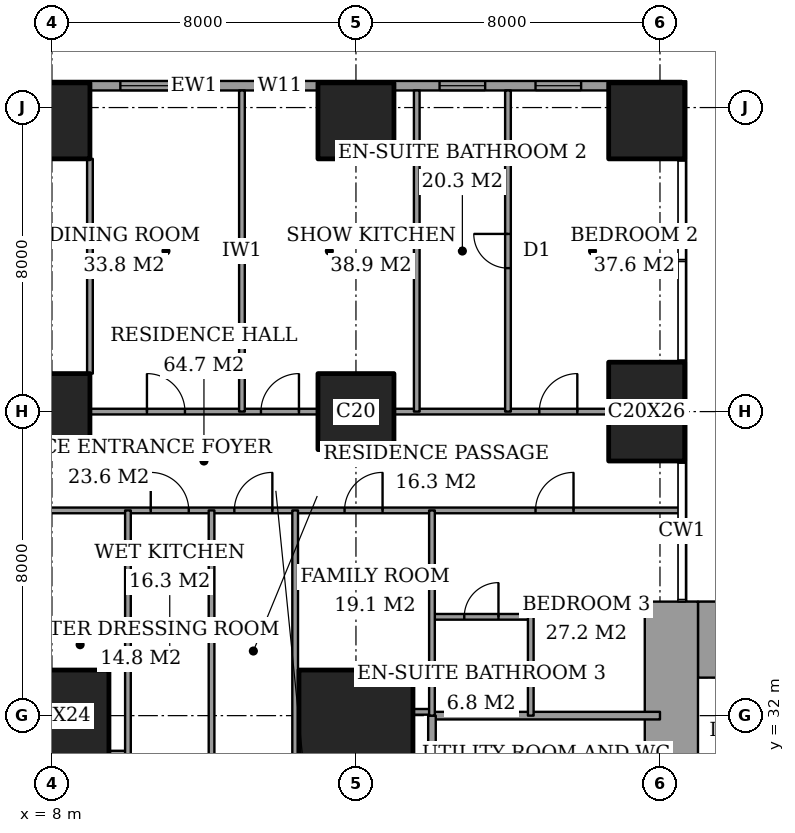
"""IFC4 building model, lengths in metres.
Left out: names, types, materials, properties, quantities, classifications, styles, units other than length and angle.
Written with IfcOpenShell. Run it as: python <this file> out.ifc"""

import sys

from ifc_helpers import new_model, si_unit, direction, frame, frame_2d, origin, origin_2d, place, context, subcontext, project, spatial, rectangle, extrude, element, fill, save


model = new_model("IFC4")
c1 = context("Model", 3, precision=1e-05, world=origin(), true_north=direction((0.0, 1.0)))
c2 = subcontext(c1, "Body", "Model", "MODEL_VIEW")
j1 = project(units=[si_unit("LENGTHUNIT", "METRE"), si_unit("PLANEANGLEUNIT", "RADIAN")], contexts=[c1])
p1 = place(None, origin())
s1 = spatial("IfcSite", under=j1, at=p1, CompositionType="ELEMENT")
p2 = place(p1, origin())
s2 = spatial("IfcBuilding", under=s1, at=p2, CompositionType="ELEMENT")
p3 = place(p2, frame((0.0, 0.0, 153.8)))
s3 = spatial("IfcBuildingStorey", under=s2, at=p3, CompositionType="ELEMENT", Elevation=153.8)
p4 = place(p3, frame((8.0, 32.0, 0.0), z_axis=(0.0, 0.0, 1.0), x_axis=(1.0, 0.0, 0.0)))
e1 = element("IfcColumn", 1, at=p4, inside=s3, PredefinedType="COLUMN", context=c2, shape_type="SweptSolid", body=[
    extrude(rectangle(XDim=3.0, YDim=2.4, at=origin_2d()), origin(), (0.0, 0.0, 1.0), 3.6),
])
for number, where, z_axis, x_axis in (
    (2, (8.0, 40.0, 0.0), (0.0, 0.0, 1.0), (1.0, 0.0, 0.0)),
    (3, (8.0, 47.65, 0.0), (0.0, 0.0, 1.0), (1.0, 0.0, 0.0)),
):
    element("IfcColumn", number, at=place(p3, frame(where, z_axis=z_axis, x_axis=x_axis)), inside=s3, PredefinedType="COLUMN", context=c2, shape_type="SweptSolid", body=[
        extrude(rectangle(XDim=2.0, YDim=2.0, at=origin_2d()), origin(), (0.0, 0.0, 1.0), 3.6),
    ])
p5 = place(p3, frame((16.0, 32.0, 0.0), z_axis=(0.0, 0.0, 1.0), x_axis=(1.0, 0.0, 0.0)))
e4 = element("IfcColumn", 4, at=p5, inside=s3, PredefinedType="COLUMN", context=c2, shape_type="SweptSolid", body=[
    extrude(rectangle(XDim=3.0, YDim=2.4, at=origin_2d()), origin(), (0.0, 0.0, 1.0), 3.6),
])
for number, where, z_axis, x_axis in (
    (5, (16.0, 40.0, 0.0), (0.0, 0.0, 1.0), (1.0, 0.0, 0.0)),
    (6, (16.0, 47.65, 0.0), (0.0, 0.0, 1.0), (1.0, 0.0, 0.0)),
):
    element("IfcColumn", number, at=place(p3, frame(where, z_axis=z_axis, x_axis=x_axis)), inside=s3, PredefinedType="COLUMN", context=c2, shape_type="SweptSolid", body=[
        extrude(rectangle(XDim=2.0, YDim=2.0, at=origin_2d()), origin(), (0.0, 0.0, 1.0), 3.6),
    ])
p6 = place(p3, frame((23.65, 40.0, 0.0), z_axis=(0.0, 0.0, 1.0), x_axis=(1.0, 0.0, 0.0)))
e7 = element("IfcColumn", 7, at=p6, inside=s3, PredefinedType="COLUMN", context=c2, shape_type="SweptSolid", body=[
    extrude(rectangle(XDim=2.0, YDim=2.6, at=origin_2d()), origin(), (0.0, 0.0, 1.0), 3.6),
])
p7 = place(p3, frame((23.65, 47.65, 0.0), z_axis=(0.0, 0.0, 1.0), x_axis=(1.0, 0.0, 0.0)))
e8 = element("IfcColumn", 8, at=p7, inside=s3, PredefinedType="COLUMN", context=c2, shape_type="SweptSolid", body=[
    extrude(rectangle(XDim=2.0, YDim=2.0, at=origin_2d()), origin(), (0.0, 0.0, 1.0), 3.6),
])
p8 = place(p3, frame((25.0, 34.0, 0.0), z_axis=(0.0, 0.0, 1.0), x_axis=(1.0, 0.0, 0.0)))
e9 = element("IfcWall", 9, at=p8, inside=s3, PredefinedType="SHEAR", context=c2, shape_type="SweptSolid", body=[
    extrude(rectangle(XDim=3.15, YDim=2.0, at=frame_2d((1.575, 0.0))), origin(), (0.0, 0.0, 1.0), 3.6),
])
p9 = place(p3, frame((24.3, 23.15, 0.0), z_axis=(0.0, 0.0, 1.0), x_axis=(0.0, 1.0, 0.0)))
e10 = element("IfcWall", 10, at=p9, inside=s3, PredefinedType="SHEAR", context=c2, shape_type="SweptSolid", body=[
    extrude(rectangle(XDim=11.85, YDim=1.4, at=frame_2d((5.925, 0.0))), origin(), (0.0, 0.0, 1.0), 3.6),
])
p10 = place(p9, frame((0.75, 0.0, 0.0)))
e11 = element("IfcOpeningElement", 11, at=p10, cuts=e10, PredefinedType="OPENING", context=c2, shape_type="SweptSolid", body=[
    extrude(rectangle(XDim=1.8, YDim=2.4, at=frame_2d((0.9, 1.2))), frame((0.0, 0.71, 0.0), z_axis=(0.0, -1.0, 0.0), x_axis=(1.0, 0.0, 0.0)), (0.0, 0.0, 1.0), 1.42),
])
p11 = place(p3, frame((24.575, 48.575, 0.0), z_axis=(0.0, 0.0, 1.0), x_axis=(-1.0, 0.0, 0.0)))
e12 = element("IfcWall", 12, at=p11, inside=s3, PredefinedType="SOLIDWALL", context=c2, shape_type="SweptSolid", body=[
    extrude(rectangle(XDim=21.4, YDim=0.25, at=frame_2d((10.7, 0.0))), origin(), (0.0, 0.0, 1.0), 3.6),
])
p12 = place(p11, frame((2.65, 0.0, 0.4)))
e13 = element("IfcOpeningElement", 13, at=p12, cuts=e12, PredefinedType="OPENING", context=c2, shape_type="SweptSolid", body=[
    extrude(rectangle(XDim=1.2, YDim=2.2, at=frame_2d((0.6, 1.1))), frame((0.0, 0.135, 0.0), z_axis=(0.0, -1.0, 0.0), x_axis=(1.0, 0.0, 0.0)), (0.0, 0.0, 1.0), 0.27),
])
p13 = place(p11, frame((5.175, 0.0, 0.4)))
e14 = element("IfcOpeningElement", 14, at=p13, cuts=e12, PredefinedType="OPENING", context=c2, shape_type="SweptSolid", body=[
    extrude(rectangle(XDim=1.2, YDim=2.2, at=frame_2d((0.6, 1.1))), frame((0.0, 0.135, 0.0), z_axis=(0.0, -1.0, 0.0), x_axis=(1.0, 0.0, 0.0)), (0.0, 0.0, 1.0), 0.27),
])
p14 = place(p11, frame((9.975, 0.0, 0.4)))
e15 = element("IfcOpeningElement", 15, at=p14, cuts=e12, PredefinedType="OPENING", context=c2, shape_type="SweptSolid", body=[
    extrude(rectangle(XDim=1.2, YDim=2.2, at=frame_2d((0.6, 1.1))), frame((0.0, 0.135, 0.0), z_axis=(0.0, -1.0, 0.0), x_axis=(1.0, 0.0, 0.0)), (0.0, 0.0, 1.0), 0.27),
])
p15 = place(p11, frame((12.375, 0.0, 0.4)))
e16 = element("IfcOpeningElement", 16, at=p15, cuts=e12, PredefinedType="OPENING", context=c2, shape_type="SweptSolid", body=[
    extrude(rectangle(XDim=2.4, YDim=2.2, at=frame_2d((1.2, 1.1))), frame((0.0, 0.135, 0.0), z_axis=(0.0, -1.0, 0.0), x_axis=(1.0, 0.0, 0.0)), (0.0, 0.0, 1.0), 0.27),
])
p16 = place(p11, frame((18.225, 0.0, 0.4)))
e17 = element("IfcOpeningElement", 17, at=p16, cuts=e12, PredefinedType="OPENING", context=c2, shape_type="SweptSolid", body=[
    extrude(rectangle(XDim=2.4, YDim=2.2, at=frame_2d((1.2, 1.1))), frame((0.0, 0.135, 0.0), z_axis=(0.0, -1.0, 0.0), x_axis=(1.0, 0.0, 0.0)), (0.0, 0.0, 1.0), 0.27),
])
p17 = place(p3, frame((9.5, 31.0, 0.0), z_axis=(0.0, 0.0, 1.0), x_axis=(1.0, 0.0, 0.0)))
e18 = element("IfcWall", 18, at=p17, inside=s3, PredefinedType="PARTITIONING", context=c2, shape_type="SweptSolid", body=[
    extrude(rectangle(XDim=0.5, YDim=0.15, at=frame_2d((0.25, 0.0))), origin(), (0.0, 0.0, 1.0), 3.35),
])
p18 = place(p3, frame((18.0, 32.0, 0.0), z_axis=(0.0, 0.0, 1.0), x_axis=(1.0, 0.0, 0.0)))
e19 = element("IfcWall", 19, at=p18, inside=s3, PredefinedType="PARTITIONING", context=c2, shape_type="SweptSolid", body=[
    extrude(rectangle(XDim=6.0, YDim=0.2, at=frame_2d((3.0, 0.0))), origin(), (0.0, 0.0, 1.0), 2.634),
])
p19 = place(p3, frame((17.5, 32.1, 0.0), z_axis=(0.0, 0.0, 1.0), x_axis=(1.0, 0.0, 0.0)))
e20 = element("IfcWall", 20, at=p19, inside=s3, PredefinedType="PARTITIONING", context=c2, shape_type="SweptSolid", body=[
    extrude(rectangle(XDim=0.5, YDim=0.15, at=frame_2d((0.25, 0.0))), origin(), (0.0, 0.0, 1.0), 2.634),
])
p20 = place(p3, frame((18.0, 34.6, 0.0), z_axis=(0.0, 0.0, 1.0), x_axis=(1.0, 0.0, 0.0)))
e21 = element("IfcWall", 21, at=p20, inside=s3, PredefinedType="PARTITIONING", context=c2, shape_type="SweptSolid", body=[
    extrude(rectangle(XDim=2.6, YDim=0.15, at=frame_2d((1.3, 0.0))), origin(), (0.0, 0.0, 1.0), 3.35),
])
p21 = place(p20, frame((0.85, 0.0, 0.0)))
e22 = element("IfcOpeningElement", 22, at=p21, cuts=e21, PredefinedType="OPENING", context=c2, shape_type="SweptSolid", body=[
    extrude(rectangle(XDim=0.9, YDim=2.1, at=frame_2d((0.45, 1.05))), frame((0.0, 0.085, 0.0), z_axis=(0.0, -1.0, 0.0), x_axis=(1.0, 0.0, 0.0)), (0.0, 0.0, 1.0), 0.17),
])
p22 = place(p3, frame((-0.45, 37.4, 0.0), z_axis=(0.0, 0.0, 1.0), x_axis=(1.0, 0.0, 0.0)))
e23 = element("IfcWall", 23, at=p22, inside=s3, PredefinedType="PARTITIONING", context=c2, shape_type="SweptSolid", body=[
    extrude(rectangle(XDim=25.011, YDim=0.15, at=frame_2d((12.505, 0.0))), origin(), (0.0, 0.0, 1.0), 3.35),
])
p23 = place(p22, frame((13.25, 0.0, 0.0)))
e24 = element("IfcOpeningElement", 24, at=p23, cuts=e23, PredefinedType="OPENING", context=c2, shape_type="SweptSolid", body=[
    extrude(rectangle(XDim=1.0, YDim=2.1, at=frame_2d((0.5, 1.05))), frame((0.0, 0.085, 0.0), z_axis=(0.0, -1.0, 0.0), x_axis=(1.0, 0.0, 0.0)), (0.0, 0.0, 1.0), 0.17),
])
p24 = place(p22, frame((3.087, 0.0, 0.0)))
e25 = element("IfcOpeningElement", 25, at=p24, cuts=e23, PredefinedType="OPENING", context=c2, shape_type="SweptSolid", body=[
    extrude(rectangle(XDim=1.0, YDim=2.1, at=frame_2d((0.5, 1.05))), frame((0.0, 0.085, 0.0), z_axis=(0.0, -1.0, 0.0), x_axis=(1.0, 0.0, 0.0)), (0.0, 0.0, 1.0), 0.17),
])
p25 = place(p22, frame((11.05, 0.0, 0.0)))
e26 = element("IfcOpeningElement", 26, at=p25, cuts=e23, PredefinedType="OPENING", context=c2, shape_type="SweptSolid", body=[
    extrude(rectangle(XDim=1.0, YDim=2.1, at=frame_2d((0.5, 1.05))), frame((0.0, 0.085, 0.0), z_axis=(0.0, -1.0, 0.0), x_axis=(1.0, 0.0, 0.0)), (0.0, 0.0, 1.0), 0.17),
])
p26 = place(p22, frame((16.15, 0.0, 0.0)))
e27 = element("IfcOpeningElement", 27, at=p26, cuts=e23, PredefinedType="OPENING", context=c2, shape_type="SweptSolid", body=[
    extrude(rectangle(XDim=1.0, YDim=2.1, at=frame_2d((0.5, 1.05))), frame((0.0, 0.085, 0.0), z_axis=(0.0, -1.0, 0.0), x_axis=(1.0, 0.0, 0.0)), (0.0, 0.0, 1.0), 0.17),
])
p27 = place(p22, frame((21.175, 0.0, 0.0)))
e28 = element("IfcOpeningElement", 28, at=p27, cuts=e23, PredefinedType="OPENING", context=c2, shape_type="SweptSolid", body=[
    extrude(rectangle(XDim=1.0, YDim=2.1, at=frame_2d((0.5, 1.05))), frame((0.0, 0.085, 0.0), z_axis=(0.0, -1.0, 0.0), x_axis=(1.0, 0.0, 0.0)), (0.0, 0.0, 1.0), 0.17),
])
p28 = place(p3, frame((9.0, 40.0, 0.0), z_axis=(0.0, 0.0, 1.0), x_axis=(1.0, 0.0, 0.0)))
e29 = element("IfcWall", 29, at=p28, inside=s3, PredefinedType="PARTITIONING", context=c2, shape_type="SweptSolid", body=[
    extrude(rectangle(XDim=6.0, YDim=0.15, at=frame_2d((3.0, 0.0))), origin(), (0.0, 0.0, 1.0), 3.35),
])
p29 = place(p28, frame((1.5, 0.0, 0.0)))
e30 = element("IfcOpeningElement", 30, at=p29, cuts=e29, PredefinedType="OPENING", context=c2, shape_type="SweptSolid", body=[
    extrude(rectangle(XDim=1.0, YDim=2.1, at=frame_2d((0.5, 1.05))), frame((0.0, 0.085, 0.0), z_axis=(0.0, -1.0, 0.0), x_axis=(1.0, 0.0, 0.0)), (0.0, 0.0, 1.0), 0.17),
])
p30 = place(p28, frame((4.5, 0.0, 0.0)))
e31 = element("IfcOpeningElement", 31, at=p30, cuts=e29, PredefinedType="OPENING", context=c2, shape_type="SweptSolid", body=[
    extrude(rectangle(XDim=1.0, YDim=2.1, at=frame_2d((0.5, 1.05))), frame((0.0, 0.085, 0.0), z_axis=(0.0, -1.0, 0.0), x_axis=(1.0, 0.0, 0.0)), (0.0, 0.0, 1.0), 0.17),
])
p31 = place(p3, frame((17.0, 40.0, 0.0), z_axis=(0.0, 0.0, 1.0), x_axis=(1.0, 0.0, 0.0)))
e32 = element("IfcWall", 32, at=p31, inside=s3, PredefinedType="PARTITIONING", context=c2, shape_type="SweptSolid", body=[
    extrude(rectangle(XDim=5.65, YDim=0.15, at=frame_2d((2.825, 0.0))), origin(), (0.0, 0.0, 1.0), 3.35),
])
p32 = place(p31, frame((3.825, 0.0, 0.0)))
e33 = element("IfcOpeningElement", 33, at=p32, cuts=e32, PredefinedType="OPENING", context=c2, shape_type="SweptSolid", body=[
    extrude(rectangle(XDim=1.0, YDim=2.1, at=frame_2d((0.5, 1.05))), frame((0.0, 0.085, 0.0), z_axis=(0.0, -1.0, 0.0), x_axis=(1.0, 0.0, 0.0)), (0.0, 0.0, 1.0), 0.17),
])
p33 = place(p3, frame((9.0, 41.0, 0.0), z_axis=(0.0, 0.0, 1.0), x_axis=(0.0, 1.0, 0.0)))
e34 = element("IfcWall", 34, at=p33, inside=s3, PredefinedType="PARTITIONING", context=c2, shape_type="SweptSolid", body=[
    extrude(rectangle(XDim=5.65, YDim=0.15, at=frame_2d((2.825, 0.0))), origin(), (0.0, 0.0, 1.0), 3.35),
])
p34 = place(p3, frame((10.0, 28.0, 0.0), z_axis=(0.0, 0.0, 1.0), x_axis=(0.0, 1.0, 0.0)))
e35 = element("IfcWall", 35, at=p34, inside=s3, PredefinedType="PARTITIONING", context=c2, shape_type="SweptSolid", body=[
    extrude(rectangle(XDim=9.4, YDim=0.15, at=frame_2d((4.7, 0.0))), origin(), (0.0, 0.0, 1.0), 3.35),
])
p35 = place(p34, frame((0.5, 0.0, 0.0)))
e36 = element("IfcOpeningElement", 36, at=p35, cuts=e35, PredefinedType="OPENING", context=c2, shape_type="SweptSolid", body=[
    extrude(rectangle(XDim=1.0, YDim=2.1, at=frame_2d((0.5, 1.05))), frame((0.0, 0.085, 0.0), z_axis=(0.0, -1.0, 0.0), x_axis=(1.0, 0.0, 0.0)), (0.0, 0.0, 1.0), 0.17),
])
p36 = place(p3, frame((12.2, 30.0, 0.0), z_axis=(0.0, 0.0, 1.0), x_axis=(0.0, 1.0, 0.0)))
e37 = element("IfcWall", 37, at=p36, inside=s3, PredefinedType="PARTITIONING", context=c2, shape_type="SweptSolid", body=[
    extrude(rectangle(XDim=7.4, YDim=0.15, at=frame_2d((3.7, 0.0))), origin(), (0.0, 0.0, 1.0), 3.35),
])
p37 = place(p3, frame((13.0, 40.0, 0.0), z_axis=(0.0, 0.0, 1.0), x_axis=(0.0, 1.0, 0.0)))
e38 = element("IfcWall", 38, at=p37, inside=s3, PredefinedType="PARTITIONING", context=c2, shape_type="SweptSolid", body=[
    extrude(rectangle(XDim=8.45, YDim=0.15, at=frame_2d((4.225, 0.0))), origin(), (0.0, 0.0, 1.0), 3.35),
])
p38 = place(p3, frame((14.4, 30.0, 0.0), z_axis=(0.0, 0.0, 1.0), x_axis=(0.0, 1.0, 0.0)))
e39 = element("IfcWall", 39, at=p38, inside=s3, PredefinedType="PARTITIONING", context=c2, shape_type="SweptSolid", body=[
    extrude(rectangle(XDim=7.4, YDim=0.15, at=frame_2d((3.7, 0.0))), origin(), (0.0, 0.0, 1.0), 3.35),
])
p39 = place(p3, frame((17.6, 40.0, 0.0), z_axis=(0.0, 0.0, 1.0), x_axis=(0.0, 1.0, 0.0)))
e40 = element("IfcWall", 40, at=p39, inside=s3, PredefinedType="PARTITIONING", context=c2, shape_type="SweptSolid", body=[
    extrude(rectangle(XDim=8.45, YDim=0.15, at=frame_2d((4.225, 0.0))), origin(), (0.0, 0.0, 1.0), 3.35),
])
p40 = place(p3, frame((18.0, 28.0, 0.0), z_axis=(0.0, 0.0, 1.0), x_axis=(0.0, 1.0, 0.0)))
e41 = element("IfcWall", 41, at=p40, inside=s3, PredefinedType="PARTITIONING", context=c2, shape_type="SweptSolid", body=[
    extrude(rectangle(XDim=4.0, YDim=0.2, at=frame_2d((2.0, 0.0))), origin(), (0.0, 0.0, 1.0), 3.35),
])
p41 = place(p40, frame((0.55, 0.0, 0.0)))
e42 = element("IfcOpeningElement", 42, at=p41, cuts=e41, PredefinedType="OPENING", context=c2, shape_type="SweptSolid", body=[
    extrude(rectangle(XDim=0.9, YDim=2.1, at=frame_2d((0.45, 1.05))), frame((0.0, 0.11, 0.0), z_axis=(0.0, -1.0, 0.0), x_axis=(1.0, 0.0, 0.0)), (0.0, 0.0, 1.0), 0.22),
])
p42 = place(p3, frame((18.0, 32.0, 0.0), z_axis=(0.0, 0.0, 1.0), x_axis=(0.0, 1.0, 0.0)))
e43 = element("IfcWall", 43, at=p42, inside=s3, PredefinedType="PARTITIONING", context=c2, shape_type="SweptSolid", body=[
    extrude(rectangle(XDim=5.4, YDim=0.15, at=frame_2d((2.7, 0.0))), origin(), (0.0, 0.0, 1.0), 3.35),
])
p43 = place(p3, frame((20.0, 40.0, 0.0), z_axis=(0.0, 0.0, 1.0), x_axis=(0.0, 1.0, 0.0)))
e44 = element("IfcWall", 44, at=p43, inside=s3, PredefinedType="PARTITIONING", context=c2, shape_type="SweptSolid", body=[
    extrude(rectangle(XDim=8.45, YDim=0.15, at=frame_2d((4.225, 0.0))), origin(), (0.0, 0.0, 1.0), 3.35),
])
p44 = place(p43, frame((3.775, 0.0, 0.0)))
e45 = element("IfcOpeningElement", 45, at=p44, cuts=e44, PredefinedType="OPENING", context=c2, shape_type="SweptSolid", body=[
    extrude(rectangle(XDim=0.9, YDim=2.1, at=frame_2d((0.45, 1.05))), frame((0.0, 0.085, 0.0), z_axis=(0.0, -1.0, 0.0), x_axis=(1.0, 0.0, 0.0)), (0.0, 0.0, 1.0), 0.17),
])
p45 = place(p3, frame((20.6, 32.0, 0.0), z_axis=(0.0, 0.0, 1.0), x_axis=(0.0, 1.0, 0.0)))
e46 = element("IfcWall", 46, at=p45, inside=s3, PredefinedType="PARTITIONING", context=c2, shape_type="SweptSolid", body=[
    extrude(rectangle(XDim=2.6, YDim=0.15, at=frame_2d((1.3, 0.0))), origin(), (0.0, 0.0, 1.0), 3.35),
])
p46 = place(p12, origin())
e47 = element("IfcWindow", 47, at=p46, inside=s3, PartitioningType="SINGLE_PANEL", PredefinedType="WINDOW", context=c2, shape_type="SweptSolid", body=[
    extrude(rectangle(XDim=1.2, YDim=2.2, at=frame_2d((0.6, 1.1))), frame((0.0, 0.03, 0.0), z_axis=(0.0, -1.0, 0.0), x_axis=(1.0, 0.0, 0.0)), (0.0, 0.0, 1.0), 0.06),
])
fill(e13, e47)
p47 = place(p13, origin())
e48 = element("IfcWindow", 48, at=p47, inside=s3, PartitioningType="SINGLE_PANEL", PredefinedType="WINDOW", context=c2, shape_type="SweptSolid", body=[
    extrude(rectangle(XDim=1.2, YDim=2.2, at=frame_2d((0.6, 1.1))), frame((0.0, 0.03, 0.0), z_axis=(0.0, -1.0, 0.0), x_axis=(1.0, 0.0, 0.0)), (0.0, 0.0, 1.0), 0.06),
])
fill(e14, e48)
p48 = place(p14, origin())
e49 = element("IfcWindow", 49, at=p48, inside=s3, PartitioningType="SINGLE_PANEL", PredefinedType="WINDOW", context=c2, shape_type="SweptSolid", body=[
    extrude(rectangle(XDim=1.2, YDim=2.2, at=frame_2d((0.6, 1.1))), frame((0.0, 0.03, 0.0), z_axis=(0.0, -1.0, 0.0), x_axis=(1.0, 0.0, 0.0)), (0.0, 0.0, 1.0), 0.06),
])
fill(e15, e49)
p49 = place(p15, origin())
e50 = element("IfcWindow", 50, at=p49, inside=s3, PartitioningType="SINGLE_PANEL", PredefinedType="WINDOW", context=c2, shape_type="SweptSolid", body=[
    extrude(rectangle(XDim=2.4, YDim=2.2, at=frame_2d((1.2, 1.1))), frame((0.0, 0.03, 0.0), z_axis=(0.0, -1.0, 0.0), x_axis=(1.0, 0.0, 0.0)), (0.0, 0.0, 1.0), 0.06),
])
fill(e16, e50)
p50 = place(p29, origin())
e51 = element("IfcDoor", 51, at=p50, inside=s3, OperationType="SINGLE_SWING_RIGHT", PredefinedType="DOOR", context=c2, shape_type="SweptSolid", body=[
    extrude(rectangle(XDim=1.0, YDim=2.1, at=frame_2d((0.5, 1.05))), frame((0.0, 0.025, 0.0), z_axis=(0.0, -1.0, 0.0), x_axis=(1.0, 0.0, 0.0)), (0.0, 0.0, 1.0), 0.05),
])
fill(e30, e51)
p51 = place(p30, origin())
e52 = element("IfcDoor", 52, at=p51, inside=s3, OperationType="SINGLE_SWING_LEFT", PredefinedType="DOOR", context=c2, shape_type="SweptSolid", body=[
    extrude(rectangle(XDim=1.0, YDim=2.1, at=frame_2d((0.5, 1.05))), frame((0.0, 0.025, 0.0), z_axis=(0.0, -1.0, 0.0), x_axis=(1.0, 0.0, 0.0)), (0.0, 0.0, 1.0), 0.05),
])
fill(e31, e52)
p52 = place(p44, origin())
e53 = element("IfcDoor", 53, at=p52, inside=s3, OperationType="SINGLE_SWING_LEFT", PredefinedType="DOOR", context=c2, shape_type="SweptSolid", body=[
    extrude(rectangle(XDim=0.9, YDim=2.1, at=frame_2d((0.45, 1.05))), frame((0.0, 0.025, 0.0), z_axis=(0.0, -1.0, 0.0), x_axis=(1.0, 0.0, 0.0)), (0.0, 0.0, 1.0), 0.05),
])
fill(e45, e53)
p53 = place(p32, origin())
e54 = element("IfcDoor", 54, at=p53, inside=s3, OperationType="SINGLE_SWING_LEFT", PredefinedType="DOOR", context=c2, shape_type="SweptSolid", body=[
    extrude(rectangle(XDim=1.0, YDim=2.1, at=frame_2d((0.5, 1.05))), frame((0.0, 0.025, 0.0), z_axis=(0.0, -1.0, 0.0), x_axis=(1.0, 0.0, 0.0)), (0.0, 0.0, 1.0), 0.05),
])
fill(e33, e54)
p54 = place(p23, origin())
e55 = element("IfcDoor", 55, at=p54, inside=s3, OperationType="SINGLE_SWING_LEFT", PredefinedType="DOOR", context=c2, shape_type="SweptSolid", body=[
    extrude(rectangle(XDim=1.0, YDim=2.1, at=frame_2d((0.5, 1.05))), frame((0.0, 0.025, 0.0), z_axis=(0.0, -1.0, 0.0), x_axis=(1.0, 0.0, 0.0)), (0.0, 0.0, 1.0), 0.05),
])
fill(e24, e55)
p55 = place(p25, origin())
e56 = element("IfcDoor", 56, at=p55, inside=s3, OperationType="SINGLE_SWING_RIGHT", PredefinedType="DOOR", context=c2, shape_type="SweptSolid", body=[
    extrude(rectangle(XDim=1.0, YDim=2.1, at=frame_2d((0.5, 1.05))), frame((0.0, 0.025, 0.0), z_axis=(0.0, -1.0, 0.0), x_axis=(1.0, 0.0, 0.0)), (0.0, 0.0, 1.0), 0.05),
])
fill(e26, e56)
p56 = place(p26, origin())
e57 = element("IfcDoor", 57, at=p56, inside=s3, OperationType="SINGLE_SWING_LEFT", PredefinedType="DOOR", context=c2, shape_type="SweptSolid", body=[
    extrude(rectangle(XDim=1.0, YDim=2.1, at=frame_2d((0.5, 1.05))), frame((0.0, 0.025, 0.0), z_axis=(0.0, -1.0, 0.0), x_axis=(1.0, 0.0, 0.0)), (0.0, 0.0, 1.0), 0.05),
])
fill(e27, e57)
p57 = place(p21, origin())
e58 = element("IfcDoor", 58, at=p57, inside=s3, OperationType="SINGLE_SWING_LEFT", PredefinedType="DOOR", context=c2, shape_type="SweptSolid", body=[
    extrude(rectangle(XDim=0.9, YDim=2.1, at=frame_2d((0.45, 1.05))), frame((0.0, 0.025, 0.0), z_axis=(0.0, -1.0, 0.0), x_axis=(1.0, 0.0, 0.0)), (0.0, 0.0, 1.0), 0.05),
])
fill(e22, e58)
p58 = place(p27, origin())
e59 = element("IfcDoor", 59, at=p58, inside=s3, OperationType="SINGLE_SWING_LEFT", PredefinedType="DOOR", context=c2, shape_type="SweptSolid", body=[
    extrude(rectangle(XDim=1.0, YDim=2.1, at=frame_2d((0.5, 1.05))), frame((0.0, 0.025, 0.0), z_axis=(0.0, -1.0, 0.0), x_axis=(1.0, 0.0, 0.0)), (0.0, 0.0, 1.0), 0.05),
])
fill(e28, e59)
save(model, sys.argv[1])
